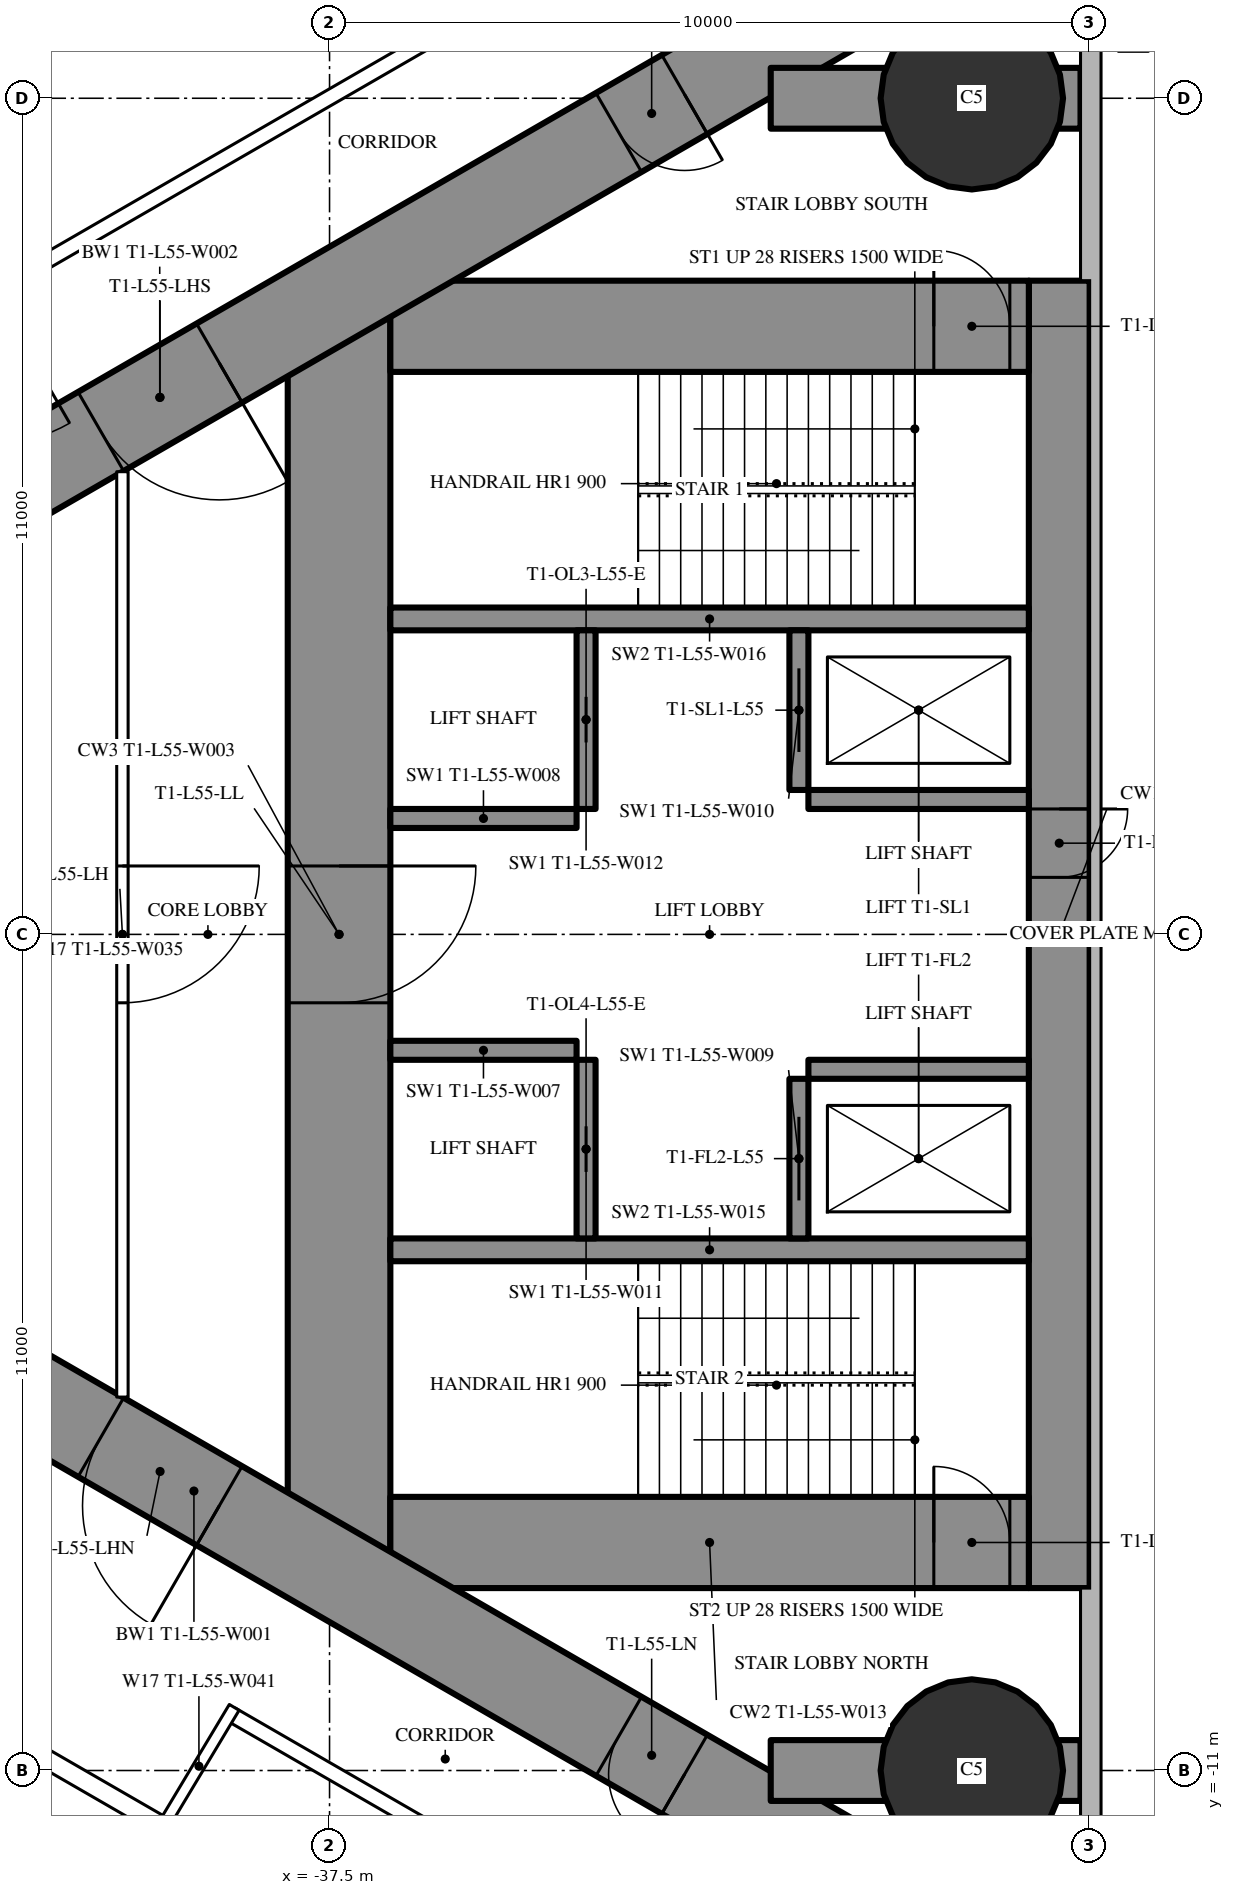
"""IFC4 building model, lengths in metres.
Left out: names, types, materials, properties, quantities, classifications, styles, units other than length and angle.
Written with IfcOpenShell. Run it as: python <this file> out.ifc"""

import sys

from ifc_helpers import new_model, si_unit, direction, frame, frame_2d, origin, origin_2d, place, context, subcontext, project, spatial, rectangle, hollow_circle, extrude, element, fill, save


model = new_model("IFC4")
c1 = context("Model", 3, precision=1e-05, world=origin(), true_north=direction((0.0, 1.0)))
c2 = subcontext(c1, "Body", "Model", "MODEL_VIEW")
j1 = project(units=[si_unit("LENGTHUNIT", "METRE"), si_unit("PLANEANGLEUNIT", "RADIAN")], contexts=[c1])
p1 = place(None, origin())
s1 = spatial("IfcSite", under=j1, at=p1, CompositionType="ELEMENT")
p2 = place(p1, origin())
s2 = spatial("IfcBuilding", under=s1, at=p2, CompositionType="ELEMENT")
p3 = place(p2, frame((0.0, 0.0, 205.3)))
s3 = spatial("IfcBuildingStorey", under=s2, at=p3, CompositionType="ELEMENT", Elevation=205.3)
for number, where, z_axis, x_axis in (
    (1, (-29.05, -11.0, 0.0), (0.0, 0.0, 1.0), (1.0, 0.0, 0.0)),
    (2, (-29.05, 11.0, 0.0), (0.0, 0.0, 1.0), (1.0, 0.0, 0.0)),
):
    element("IfcColumn", number, at=place(p3, frame(where, z_axis=z_axis, x_axis=x_axis)), inside=s3, PredefinedType="COLUMN", context=c2, shape_type="SweptSolid", body=[
        extrude(hollow_circle(Radius=1.2, WallThickness=0.09, at=origin_2d()), origin(), (0.0, 0.0, 1.0), 5.0),
    ])
p4 = place(p3, frame((-27.9, 8.6, 0.0), z_axis=(0.0, 0.0, 1.0), x_axis=(0.0, -1.0, 0.0)))
e3 = element("IfcWall", 3, at=p4, inside=s3, PredefinedType="SHEAR", context=c2, shape_type="SweptSolid", body=[
    extrude(rectangle(XDim=17.2, YDim=0.8, at=frame_2d((8.6, 0.0))), origin(), (0.0, 0.0, 1.0), 5.0),
])
p5 = place(p4, frame((6.95, 0.0, 0.0)))
e4 = element("IfcOpeningElement", 4, at=p5, cuts=e3, PredefinedType="OPENING", context=c2, shape_type="SweptSolid", body=[
    extrude(rectangle(XDim=0.9, YDim=2.2, at=frame_2d((0.45, 1.1))), frame((0.0, 0.41, 0.0), z_axis=(0.0, -1.0, 0.0), x_axis=(1.0, 0.0, 0.0)), (0.0, 0.0, 1.0), 0.82),
])
p6 = place(p3, frame((-37.375, 8.6, 0.0), z_axis=(0.0, 0.0, 1.0), x_axis=(0.0, -1.0, 0.0)))
e5 = element("IfcWall", 5, at=p6, inside=s3, PredefinedType="SHEAR", context=c2, shape_type="SweptSolid", body=[
    extrude(rectangle(XDim=17.2, YDim=1.35, at=frame_2d((8.6, 0.0))), origin(), (0.0, 0.0, 1.0), 5.0),
])
p7 = place(p6, frame((7.7, 0.0, 0.0)))
e6 = element("IfcOpeningElement", 6, at=p7, cuts=e5, PredefinedType="OPENING", context=c2, shape_type="SweptSolid", body=[
    extrude(rectangle(XDim=1.8, YDim=2.2, at=frame_2d((0.9, 1.1))), frame((0.0, 0.685, 0.0), z_axis=(0.0, -1.0, 0.0), x_axis=(1.0, 0.0, 0.0)), (0.0, 0.0, 1.0), 1.37),
])
p8 = place(p3, frame((-28.3, 8.0, 0.0), z_axis=(0.0, 0.0, 1.0), x_axis=(-1.0, 0.0, 0.0)))
e7 = element("IfcWall", 7, at=p8, inside=s3, PredefinedType="SHEAR", context=c2, shape_type="SweptSolid", body=[
    extrude(rectangle(XDim=8.4, YDim=1.2, at=frame_2d((4.2, 0.0))), origin(), (0.0, 0.0, 1.0), 5.0),
])
p9 = place(p8, frame((0.25, 0.0, 0.0)))
e8 = element("IfcOpeningElement", 8, at=p9, cuts=e7, PredefinedType="OPENING", context=c2, shape_type="SweptSolid", body=[
    extrude(rectangle(XDim=1.0, YDim=2.2, at=frame_2d((0.5, 1.1))), frame((0.0, 0.61, 0.0), z_axis=(0.0, -1.0, 0.0), x_axis=(1.0, 0.0, 0.0)), (0.0, 0.0, 1.0), 1.22),
])
p10 = place(p3, frame((-28.3, -8.0, 0.0), z_axis=(0.0, 0.0, 1.0), x_axis=(-1.0, 0.0, 0.0)))
e9 = element("IfcWall", 9, at=p10, inside=s3, PredefinedType="SHEAR", context=c2, shape_type="SweptSolid", body=[
    extrude(rectangle(XDim=8.4, YDim=1.2, at=frame_2d((4.2, 0.0))), origin(), (0.0, 0.0, 1.0), 5.0),
])
p11 = place(p10, frame((0.25, 0.0, 0.0)))
e10 = element("IfcOpeningElement", 10, at=p11, cuts=e9, PredefinedType="OPENING", context=c2, shape_type="SweptSolid", body=[
    extrude(rectangle(XDim=1.0, YDim=2.2, at=frame_2d((0.5, 1.1))), frame((0.0, 0.61, 0.0), z_axis=(0.0, -1.0, 0.0), x_axis=(1.0, 0.0, 0.0)), (0.0, 0.0, 1.0), 1.22),
])
for number, where, z_axis, x_axis in (
    (11, (-28.3, 4.15, 0.0), (0.0, 0.0, 1.0), (-1.0, 0.0, 0.0)),
    (12, (-28.3, -4.15, 0.0), (0.0, 0.0, 1.0), (-1.0, 0.0, 0.0)),
):
    element("IfcWall", number, at=place(p3, frame(where, z_axis=z_axis, x_axis=x_axis)), inside=s3, PredefinedType="SHEAR", context=c2, shape_type="SweptSolid", body=[
        extrude(rectangle(XDim=8.4, YDim=0.3, at=frame_2d((4.2, 0.0))), origin(), (0.0, 0.0, 1.0), 5.0),
    ])
p12 = place(p3, frame((-31.325, 4.0, 0.0), z_axis=(0.0, 0.0, 1.0), x_axis=(0.0, -1.0, 0.0)))
e13 = element("IfcWall", 13, at=p12, inside=s3, PredefinedType="SHEAR", context=c2, shape_type="SweptSolid", body=[
    extrude(rectangle(XDim=2.1, YDim=0.25, at=frame_2d((1.05, 0.0))), origin(), (0.0, 0.0, 1.0), 5.0),
])
p13 = place(p12, frame((0.5, 0.0, 0.0)))
e14 = element("IfcOpeningElement", 14, at=p13, cuts=e13, PredefinedType="OPENING", context=c2, shape_type="SweptSolid", body=[
    extrude(rectangle(XDim=1.1, YDim=2.2, at=frame_2d((0.55, 1.1))), frame((0.0, 0.135, 0.0), z_axis=(0.0, -1.0, 0.0), x_axis=(1.0, 0.0, 0.0)), (0.0, 0.0, 1.0), 0.27),
])
p14 = place(p3, frame((-34.125, 4.0, 0.0), z_axis=(0.0, 0.0, 1.0), x_axis=(0.0, -1.0, 0.0)))
e15 = element("IfcWall", 15, at=p14, inside=s3, PredefinedType="SHEAR", context=c2, shape_type="SweptSolid", body=[
    extrude(rectangle(XDim=2.35, YDim=0.25, at=frame_2d((1.175, 0.0))), origin(), (0.0, 0.0, 1.0), 5.0),
])
p15 = place(p14, frame((0.875, 0.0, 0.0)))
e16 = element("IfcOpeningElement", 16, at=p15, cuts=e15, PredefinedType="OPENING", context=c2, shape_type="SweptSolid", body=[
    extrude(rectangle(XDim=0.6, YDim=2.0, at=frame_2d((0.3, 1.0))), frame((0.0, 0.135, 0.0), z_axis=(0.0, -1.0, 0.0), x_axis=(1.0, 0.0, 0.0)), (0.0, 0.0, 1.0), 0.27),
])
p16 = place(p3, frame((-28.3, 1.775, 0.0), z_axis=(0.0, 0.0, 1.0), x_axis=(-1.0, 0.0, 0.0)))
e17 = element("IfcWall", 17, at=p16, inside=s3, PredefinedType="SHEAR", context=c2, shape_type="SweptSolid", body=[
    extrude(rectangle(XDim=2.9, YDim=0.25, at=frame_2d((1.45, 0.0))), origin(), (0.0, 0.0, 1.0), 5.0),
])
p17 = place(p3, frame((-34.25, 1.525, 0.0), z_axis=(0.0, 0.0, 1.0), x_axis=(-1.0, 0.0, 0.0)))
e18 = element("IfcWall", 18, at=p17, inside=s3, PredefinedType="SHEAR", context=c2, shape_type="SweptSolid", body=[
    extrude(rectangle(XDim=2.45, YDim=0.25, at=frame_2d((1.225, 0.0))), origin(), (0.0, 0.0, 1.0), 5.0),
])
p18 = place(p3, frame((-31.325, -1.9, 0.0), z_axis=(0.0, 0.0, 1.0), x_axis=(0.0, -1.0, 0.0)))
e19 = element("IfcWall", 19, at=p18, inside=s3, PredefinedType="SHEAR", context=c2, shape_type="SweptSolid", body=[
    extrude(rectangle(XDim=2.1, YDim=0.25, at=frame_2d((1.05, 0.0))), origin(), (0.0, 0.0, 1.0), 5.0),
])
p19 = place(p18, frame((0.5, 0.0, 0.0)))
e20 = element("IfcOpeningElement", 20, at=p19, cuts=e19, PredefinedType="OPENING", context=c2, shape_type="SweptSolid", body=[
    extrude(rectangle(XDim=1.1, YDim=2.2, at=frame_2d((0.55, 1.1))), frame((0.0, 0.135, 0.0), z_axis=(0.0, -1.0, 0.0), x_axis=(1.0, 0.0, 0.0)), (0.0, 0.0, 1.0), 0.27),
])
p20 = place(p3, frame((-34.125, -1.65, 0.0), z_axis=(0.0, 0.0, 1.0), x_axis=(0.0, -1.0, 0.0)))
e21 = element("IfcWall", 21, at=p20, inside=s3, PredefinedType="SHEAR", context=c2, shape_type="SweptSolid", body=[
    extrude(rectangle(XDim=2.35, YDim=0.25, at=frame_2d((1.175, 0.0))), origin(), (0.0, 0.0, 1.0), 5.0),
])
p21 = place(p20, frame((0.875, 0.0, 0.0)))
e22 = element("IfcOpeningElement", 22, at=p21, cuts=e21, PredefinedType="OPENING", context=c2, shape_type="SweptSolid", body=[
    extrude(rectangle(XDim=0.6, YDim=2.0, at=frame_2d((0.3, 1.0))), frame((0.0, 0.135, 0.0), z_axis=(0.0, -1.0, 0.0), x_axis=(1.0, 0.0, 0.0)), (0.0, 0.0, 1.0), 0.27),
])
p22 = place(p3, frame((-28.3, -1.775, 0.0), z_axis=(0.0, 0.0, 1.0), x_axis=(-1.0, 0.0, 0.0)))
e23 = element("IfcWall", 23, at=p22, inside=s3, PredefinedType="SHEAR", context=c2, shape_type="SweptSolid", body=[
    extrude(rectangle(XDim=2.9, YDim=0.25, at=frame_2d((1.45, 0.0))), origin(), (0.0, 0.0, 1.0), 5.0),
])
p23 = place(p3, frame((-34.25, -1.525, 0.0), z_axis=(0.0, 0.0, 1.0), x_axis=(-1.0, 0.0, 0.0)))
e24 = element("IfcWall", 24, at=p23, inside=s3, PredefinedType="SHEAR", context=c2, shape_type="SweptSolid", body=[
    extrude(rectangle(XDim=2.45, YDim=0.25, at=frame_2d((1.225, 0.0))), origin(), (0.0, 0.0, 1.0), 5.0),
])
p24 = place(p3, frame((-27.2, 14.3, 0.0), z_axis=(0.0, 0.0, 1.0), x_axis=(-0.866026593062, -0.499997940104, 0.0)))
e25 = element("IfcWall", 25, at=p24, inside=s3, PredefinedType="SHEAR", context=c2, shape_type="SweptSolid", body=[
    extrude(rectangle(XDim=28.946, YDim=1.2, at=frame_2d((14.473, 0.0))), origin(), (0.0, 0.0, 1.0), 5.0),
])
p25 = place(p24, frame((6.5, 0.0, 0.0)))
e26 = element("IfcOpeningElement", 26, at=p25, cuts=e25, PredefinedType="OPENING", context=c2, shape_type="SweptSolid", body=[
    extrude(rectangle(XDim=1.0, YDim=2.2, at=frame_2d((0.5, 1.1))), frame((0.0, 0.61, 0.0), z_axis=(0.0, -1.0, 0.0), x_axis=(1.0, 0.0, 0.0)), (0.0, 0.0, 1.0), 1.22),
])
p26 = place(p24, frame((13.568, 0.0, 0.0)))
e27 = element("IfcOpeningElement", 27, at=p26, cuts=e25, PredefinedType="OPENING", context=c2, shape_type="SweptSolid", body=[
    extrude(rectangle(XDim=1.8, YDim=2.2, at=frame_2d((0.9, 1.1))), frame((0.0, 0.61, 0.0), z_axis=(0.0, -1.0, 0.0), x_axis=(1.0, 0.0, 0.0)), (0.0, 0.0, 1.0), 1.22),
])
p27 = place(p3, frame((-27.2, -14.3, 0.0), z_axis=(0.0, 0.0, 1.0), x_axis=(-0.866024021859, 0.500002393557, 0.0)))
e28 = element("IfcWall", 28, at=p27, inside=s3, PredefinedType="SHEAR", context=c2, shape_type="SweptSolid", body=[
    extrude(rectangle(XDim=27.907, YDim=1.2, at=frame_2d((13.954, 0.0))), origin(), (0.0, 0.0, 1.0), 5.0),
])
p28 = place(p27, frame((6.5, 0.0, 0.0)))
e29 = element("IfcOpeningElement", 29, at=p28, cuts=e28, PredefinedType="OPENING", context=c2, shape_type="SweptSolid", body=[
    extrude(rectangle(XDim=1.0, YDim=2.2, at=frame_2d((0.5, 1.1))), frame((0.0, 0.61, 0.0), z_axis=(0.0, -1.0, 0.0), x_axis=(1.0, 0.0, 0.0)), (0.0, 0.0, 1.0), 1.22),
])
p29 = place(p27, frame((13.568, 0.0, 0.0)))
e30 = element("IfcOpeningElement", 30, at=p29, cuts=e28, PredefinedType="OPENING", context=c2, shape_type="SweptSolid", body=[
    extrude(rectangle(XDim=1.8, YDim=2.2, at=frame_2d((0.9, 1.1))), frame((0.0, 0.61, 0.0), z_axis=(0.0, -1.0, 0.0), x_axis=(1.0, 0.0, 0.0)), (0.0, 0.0, 1.0), 1.22),
])
for number, where, z_axis, x_axis in (
    (31, (-27.62, -11.0, 0.0), (0.0, 0.0, 1.0), (-1.0, 0.0, 0.0)),
    (32, (-27.62, 11.0, 0.0), (0.0, 0.0, 1.0), (-1.0, 0.0, 0.0)),
):
    element("IfcWall", number, at=place(p3, frame(where, z_axis=z_axis, x_axis=x_axis)), inside=s3, PredefinedType="SHEAR", context=c2, shape_type="SweptSolid", body=[
        extrude(rectangle(XDim=4.076, YDim=0.8, at=frame_2d((2.038, 0.0))), origin(), (0.0, 0.0, 1.0), 5.0),
    ])
p30 = place(p3, frame((-27.86, 16.575, 0.0), z_axis=(0.0, 0.0, 1.0), x_axis=(-0.866025533911, -0.499999774615, 0.0)))
e33 = element("IfcWall", 33, at=p30, inside=s3, PredefinedType="PARTITIONING", context=c2, shape_type="SweptSolid", body=[
    extrude(rectangle(XDim=33.149, YDim=0.2, at=frame_2d((16.575, 0.0))), origin(), (0.0, 0.0, 1.0), 4.75),
])
p31 = place(p30, frame((6.051, 0.0, 0.0)))
e34 = element("IfcOpeningElement", 34, at=p31, cuts=e33, PredefinedType="OPENING", context=c2, shape_type="SweptSolid", body=[
    extrude(rectangle(XDim=1.8, YDim=2.2, at=frame_2d((0.9, 1.1))), frame((0.0, 0.11, 0.0), z_axis=(0.0, -1.0, 0.0), x_axis=(1.0, 0.0, 0.0)), (0.0, 0.0, 1.0), 0.22),
])
p32 = place(p30, frame((16.234, 0.0, 0.0)))
e35 = element("IfcOpeningElement", 35, at=p32, cuts=e33, PredefinedType="OPENING", context=c2, shape_type="SweptSolid", body=[
    extrude(rectangle(XDim=2.0, YDim=2.4, at=frame_2d((1.0, 1.2))), frame((0.0, 0.11, 0.0), z_axis=(0.0, -1.0, 0.0), x_axis=(1.0, 0.0, 0.0)), (0.0, 0.0, 1.0), 0.22),
])
p33 = place(p30, frame((26.082, 0.0, 0.0)))
e36 = element("IfcOpeningElement", 36, at=p33, cuts=e33, PredefinedType="OPENING", context=c2, shape_type="SweptSolid", body=[
    extrude(rectangle(XDim=2.0, YDim=2.4, at=frame_2d((1.0, 1.2))), frame((0.0, 0.11, 0.0), z_axis=(0.0, -1.0, 0.0), x_axis=(1.0, 0.0, 0.0)), (0.0, 0.0, 1.0), 0.22),
])
p34 = place(p3, frame((-27.86, -16.575, 0.0), z_axis=(0.0, 0.0, 1.0), x_axis=(-0.866027756871, 0.499995924312, 0.0)))
e37 = element("IfcWall", 37, at=p34, inside=s3, PredefinedType="PARTITIONING", context=c2, shape_type="SweptSolid", body=[
    extrude(rectangle(XDim=12.622, YDim=0.2, at=frame_2d((6.311, 0.0))), origin(), (0.0, 0.0, 1.0), 4.75),
])
p35 = place(p34, frame((5.411, 0.0, 0.0)))
e38 = element("IfcOpeningElement", 38, at=p35, cuts=e37, PredefinedType="OPENING", context=c2, shape_type="SweptSolid", body=[
    extrude(rectangle(XDim=1.8, YDim=2.2, at=frame_2d((0.9, 1.1))), frame((0.0, 0.11, 0.0), z_axis=(0.0, -1.0, 0.0), x_axis=(1.0, 0.0, 0.0)), (0.0, 0.0, 1.0), 0.22),
])
p36 = place(p3, frame((-39.683, -11.718, 0.0), z_axis=(0.0, 0.0, 1.0), x_axis=(0.514336634837, 0.857588377991, 0.0)))
e39 = element("IfcWall", 39, at=p36, inside=s3, PredefinedType="PARTITIONING", context=c2, shape_type="SweptSolid", body=[
    extrude(rectangle(XDim=1.805, YDim=0.15, at=frame_2d((0.903, 0.0))), origin(), (0.0, 0.0, 1.0), 4.75),
])
p37 = place(p3, frame((-40.225, 6.087, 0.0), z_axis=(0.0, 0.0, 1.0), x_axis=(0.0, -1.0, 0.0)))
e40 = element("IfcWall", 40, at=p37, inside=s3, PredefinedType="PARTITIONING", context=c2, shape_type="SweptSolid", body=[
    extrude(rectangle(XDim=12.174, YDim=0.15, at=frame_2d((6.087, 0.0))), origin(), (0.0, 0.0, 1.0), 4.75),
])
p38 = place(p37, frame((5.187, 0.0, 0.0)))
e41 = element("IfcOpeningElement", 41, at=p38, cuts=e40, PredefinedType="OPENING", context=c2, shape_type="SweptSolid", body=[
    extrude(rectangle(XDim=1.8, YDim=2.2, at=frame_2d((0.9, 1.1))), frame((0.0, 0.085, 0.0), z_axis=(0.0, -1.0, 0.0), x_axis=(1.0, 0.0, 0.0)), (0.0, 0.0, 1.0), 0.17),
])
p39 = place(p3, frame((-39.758, -11.697, 0.0), z_axis=(0.0, 0.0, 1.0), x_axis=(-0.866024194504, 0.500002094529, 0.0)))
e42 = element("IfcWall", 42, at=p39, inside=s3, PredefinedType="PARTITIONING", context=c2, shape_type="SweptSolid", body=[
    extrude(rectangle(XDim=6.6, YDim=0.25, at=frame_2d((3.3, 0.0))), origin(), (0.0, 0.0, 1.0), 4.75),
])
p40 = place(p38, origin())
e43 = element("IfcDoor", 43, at=p40, inside=s3, OperationType="DOUBLE_DOOR_SINGLE_SWING", PredefinedType="DOOR", context=c2, shape_type="SweptSolid", body=[
    extrude(rectangle(XDim=1.8, YDim=2.2, at=frame_2d((0.9, 1.1))), frame((0.0, 0.025, 0.0), z_axis=(0.0, -1.0, 0.0), x_axis=(1.0, 0.0, 0.0)), (0.0, 0.0, 1.0), 0.05),
])
fill(e41, e43)
p41 = place(p25, origin())
e44 = element("IfcDoor", 44, at=p41, inside=s3, OperationType="SINGLE_SWING_LEFT", PredefinedType="DOOR", context=c2, shape_type="SweptSolid", body=[
    extrude(rectangle(XDim=1.0, YDim=2.2, at=frame_2d((0.5, 1.1))), frame((0.0, 0.025, 0.0), z_axis=(0.0, -1.0, 0.0), x_axis=(1.0, 0.0, 0.0)), (0.0, 0.0, 1.0), 0.05),
])
fill(e26, e44)
p42 = place(p26, origin())
e45 = element("IfcDoor", 45, at=p42, inside=s3, OperationType="DOUBLE_DOOR_SINGLE_SWING", PredefinedType="DOOR", context=c2, shape_type="SweptSolid", body=[
    extrude(rectangle(XDim=1.8, YDim=2.2, at=frame_2d((0.9, 1.1))), frame((0.0, 0.025, 0.0), z_axis=(0.0, -1.0, 0.0), x_axis=(1.0, 0.0, 0.0)), (0.0, 0.0, 1.0), 0.05),
])
fill(e27, e45)
p43 = place(p28, origin())
e46 = element("IfcDoor", 46, at=p43, inside=s3, OperationType="SINGLE_SWING_LEFT", PredefinedType="DOOR", context=c2, shape_type="SweptSolid", body=[
    extrude(rectangle(XDim=1.0, YDim=2.2, at=frame_2d((0.5, 1.1))), frame((0.0, 0.025, 0.0), z_axis=(0.0, -1.0, 0.0), x_axis=(1.0, 0.0, 0.0)), (0.0, 0.0, 1.0), 0.05),
])
fill(e29, e46)
p44 = place(p29, origin())
e47 = element("IfcDoor", 47, at=p44, inside=s3, OperationType="DOUBLE_DOOR_SINGLE_SWING", PredefinedType="DOOR", context=c2, shape_type="SweptSolid", body=[
    extrude(rectangle(XDim=1.8, YDim=2.2, at=frame_2d((0.9, 1.1))), frame((0.0, 0.025, 0.0), z_axis=(0.0, -1.0, 0.0), x_axis=(1.0, 0.0, 0.0)), (0.0, 0.0, 1.0), 0.05),
])
fill(e30, e47)
p45 = place(p7, origin())
e48 = element("IfcDoor", 48, at=p45, inside=s3, OperationType="DOUBLE_DOOR_SINGLE_SWING", PredefinedType="DOOR", context=c2, shape_type="SweptSolid", body=[
    extrude(rectangle(XDim=1.8, YDim=2.2, at=frame_2d((0.9, 1.1))), frame((0.0, 0.025, 0.0), z_axis=(0.0, -1.0, 0.0), x_axis=(1.0, 0.0, 0.0)), (0.0, 0.0, 1.0), 0.05),
])
fill(e6, e48)
p46 = place(p9, origin())
e49 = element("IfcDoor", 49, at=p46, inside=s3, OperationType="SINGLE_SWING_RIGHT", PredefinedType="DOOR", context=c2, shape_type="SweptSolid", body=[
    extrude(rectangle(XDim=1.0, YDim=2.2, at=frame_2d((0.5, 1.1))), frame((0.0, 0.025, 0.0), z_axis=(0.0, -1.0, 0.0), x_axis=(1.0, 0.0, 0.0)), (0.0, 0.0, 1.0), 0.05),
])
fill(e8, e49)
p47 = place(p11, origin())
e50 = element("IfcDoor", 50, at=p47, inside=s3, OperationType="SINGLE_SWING_RIGHT", PredefinedType="DOOR", context=c2, shape_type="SweptSolid", body=[
    extrude(rectangle(XDim=1.0, YDim=2.2, at=frame_2d((0.5, 1.1))), frame((0.0, 0.025, 0.0), z_axis=(0.0, -1.0, 0.0), x_axis=(1.0, 0.0, 0.0)), (0.0, 0.0, 1.0), 0.05),
])
fill(e10, e50)
p48 = place(p5, origin())
e51 = element("IfcDoor", 51, at=p48, inside=s3, OperationType="SINGLE_SWING_LEFT", PredefinedType="DOOR", context=c2, shape_type="SweptSolid", body=[
    extrude(rectangle(XDim=0.9, YDim=2.2, at=frame_2d((0.45, 1.1))), frame((0.0, 0.025, 0.0), z_axis=(0.0, -1.0, 0.0), x_axis=(1.0, 0.0, 0.0)), (0.0, 0.0, 1.0), 0.05),
])
fill(e4, e51)
p49 = place(p13, origin())
e52 = element("IfcDoor", 52, at=p49, inside=s3, OperationType="SLIDING_TO_LEFT", PredefinedType="USERDEFINED", context=c2, shape_type="SweptSolid", body=[
    extrude(rectangle(XDim=1.1, YDim=2.2, at=frame_2d((0.55, 1.1))), frame((0.0, 0.025, 0.0), z_axis=(0.0, -1.0, 0.0), x_axis=(1.0, 0.0, 0.0)), (0.0, 0.0, 1.0), 0.05),
])
fill(e14, e52)
p50 = place(p19, origin())
e53 = element("IfcDoor", 53, at=p50, inside=s3, OperationType="SLIDING_TO_LEFT", PredefinedType="USERDEFINED", context=c2, shape_type="SweptSolid", body=[
    extrude(rectangle(XDim=1.1, YDim=2.2, at=frame_2d((0.55, 1.1))), frame((0.0, 0.025, 0.0), z_axis=(0.0, -1.0, 0.0), x_axis=(1.0, 0.0, 0.0)), (0.0, 0.0, 1.0), 0.05),
])
fill(e20, e53)
p51 = place(p15, origin())
e54 = element("IfcDoor", 54, at=p51, inside=s3, OperationType="SLIDING_TO_LEFT", PredefinedType="DOOR", context=c2, shape_type="SweptSolid", body=[
    extrude(rectangle(XDim=0.6, YDim=2.0, at=frame_2d((0.3, 1.0))), frame((0.0, 0.025, 0.0), z_axis=(0.0, -1.0, 0.0), x_axis=(1.0, 0.0, 0.0)), (0.0, 0.0, 1.0), 0.05),
])
fill(e16, e54)
p52 = place(p21, origin())
e55 = element("IfcDoor", 55, at=p52, inside=s3, OperationType="SLIDING_TO_LEFT", PredefinedType="DOOR", context=c2, shape_type="SweptSolid", body=[
    extrude(rectangle(XDim=0.6, YDim=2.0, at=frame_2d((0.3, 1.0))), frame((0.0, 0.025, 0.0), z_axis=(0.0, -1.0, 0.0), x_axis=(1.0, 0.0, 0.0)), (0.0, 0.0, 1.0), 0.05),
])
fill(e22, e55)
save(model, sys.argv[1])
